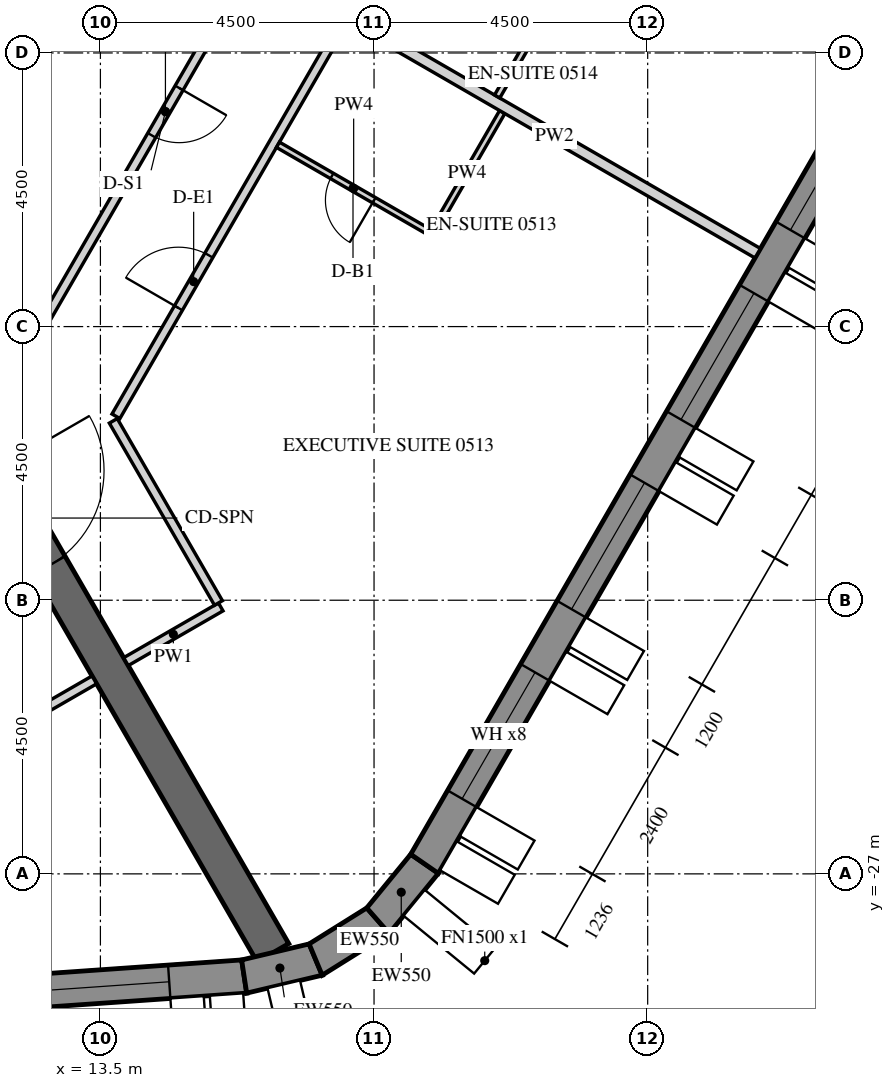
"""IFC4 building model, lengths in metres.
Left out: names, types, materials, properties, quantities, classifications, styles, units other than length and angle.
Written with IfcOpenShell. Run it as: python <this file> out.ifc"""

import sys

from ifc_helpers import new_model, si_unit, direction, frame, frame_2d, origin, place, context, subcontext, project, spatial, polyline, rectangle, outline, extrude, element, fill, save


model = new_model("IFC4")
c1 = context("Model", 3, precision=1e-05, world=origin(), true_north=direction((0.0, 1.0)))
c2 = subcontext(c1, "Body", "Model", "MODEL_VIEW")
j1 = project(units=[si_unit("LENGTHUNIT", "METRE"), si_unit("PLANEANGLEUNIT", "RADIAN")], contexts=[c1])
p1 = place(None, origin())
s1 = spatial("IfcSite", under=j1, at=p1, CompositionType="ELEMENT")
p2 = place(p1, origin())
s2 = spatial("IfcBuilding", under=s1, at=p2, CompositionType="ELEMENT")
p3 = place(p2, frame((0.0, 0.0, 80.4)))
s3 = spatial("IfcBuildingStorey", under=s2, at=p3, CompositionType="ELEMENT", Elevation=80.4)
p4 = place(p3, frame((-14.134, -30.786, -0.15), z_axis=(0.0, 0.0, 1.0), x_axis=(0.997564037441, 0.069756657061, 0.0)))
e1 = element("IfcWall", 1, at=p4, inside=s3, PredefinedType="SOLIDWALL", context=c2, shape_type="SweptSolid", body=[
    extrude(outline(polyline([(-0.026, -0.275), (30.094, -0.275), (30.049, 0.275), (0.026, 0.275), (-0.026, -0.275)])), origin(), (0.0, 0.0, 1.0), 3.9),
])
p5 = place(p4, frame((1.236, 0.0, 1.05)))
e2 = element("IfcOpeningElement", 2, at=p5, cuts=e1, PredefinedType="OPENING", context=c2, shape_type="SweptSolid", body=[
    extrude(rectangle(XDim=2.4, YDim=2.4, at=frame_2d((1.2, 1.2))), frame((0.0, 0.285, 0.0), z_axis=(0.0, -1.0, 0.0), x_axis=(1.0, 0.0, 0.0)), (0.0, 0.0, 1.0), 0.57),
])
p6 = place(p4, frame((4.835, 0.0, 1.05)))
e3 = element("IfcOpeningElement", 3, at=p6, cuts=e1, PredefinedType="OPENING", context=c2, shape_type="SweptSolid", body=[
    extrude(rectangle(XDim=2.4, YDim=2.4, at=frame_2d((1.2, 1.2))), frame((0.0, 0.285, 0.0), z_axis=(0.0, -1.0, 0.0), x_axis=(1.0, 0.0, 0.0)), (0.0, 0.0, 1.0), 0.57),
])
p7 = place(p4, frame((8.436, 0.0, 1.05)))
e4 = element("IfcOpeningElement", 4, at=p7, cuts=e1, PredefinedType="OPENING", context=c2, shape_type="SweptSolid", body=[
    extrude(rectangle(XDim=2.4, YDim=2.4, at=frame_2d((1.2, 1.2))), frame((0.0, 0.285, 0.0), z_axis=(0.0, -1.0, 0.0), x_axis=(1.0, 0.0, 0.0)), (0.0, 0.0, 1.0), 0.57),
])
p8 = place(p4, frame((12.035, 0.0, 1.05)))
e5 = element("IfcOpeningElement", 5, at=p8, cuts=e1, PredefinedType="OPENING", context=c2, shape_type="SweptSolid", body=[
    extrude(rectangle(XDim=2.4, YDim=2.4, at=frame_2d((1.2, 1.2))), frame((0.0, 0.285, 0.0), z_axis=(0.0, -1.0, 0.0), x_axis=(1.0, 0.0, 0.0)), (0.0, 0.0, 1.0), 0.57),
])
p9 = place(p4, frame((15.635, 0.0, 1.05)))
e6 = element("IfcOpeningElement", 6, at=p9, cuts=e1, PredefinedType="OPENING", context=c2, shape_type="SweptSolid", body=[
    extrude(rectangle(XDim=2.4, YDim=2.4, at=frame_2d((1.2, 1.2))), frame((0.0, 0.285, 0.0), z_axis=(0.0, -1.0, 0.0), x_axis=(1.0, 0.0, 0.0)), (0.0, 0.0, 1.0), 0.57),
])
p10 = place(p4, frame((19.236, 0.0, 1.05)))
e7 = element("IfcOpeningElement", 7, at=p10, cuts=e1, PredefinedType="OPENING", context=c2, shape_type="SweptSolid", body=[
    extrude(rectangle(XDim=2.4, YDim=2.4, at=frame_2d((1.2, 1.2))), frame((0.0, 0.285, 0.0), z_axis=(0.0, -1.0, 0.0), x_axis=(1.0, 0.0, 0.0)), (0.0, 0.0, 1.0), 0.57),
])
p11 = place(p4, frame((22.835, 0.0, 1.05)))
e8 = element("IfcOpeningElement", 8, at=p11, cuts=e1, PredefinedType="OPENING", context=c2, shape_type="SweptSolid", body=[
    extrude(rectangle(XDim=2.4, YDim=2.4, at=frame_2d((1.2, 1.2))), frame((0.0, 0.285, 0.0), z_axis=(0.0, -1.0, 0.0), x_axis=(1.0, 0.0, 0.0)), (0.0, 0.0, 1.0), 0.57),
])
p12 = place(p4, frame((26.436, 0.0, 1.05)))
e9 = element("IfcOpeningElement", 9, at=p12, cuts=e1, PredefinedType="OPENING", context=c2, shape_type="SweptSolid", body=[
    extrude(rectangle(XDim=2.4, YDim=2.4, at=frame_2d((1.2, 1.2))), frame((0.0, 0.285, 0.0), z_axis=(0.0, -1.0, 0.0), x_axis=(1.0, 0.0, 0.0)), (0.0, 0.0, 1.0), 0.57),
])
p13 = place(p3, frame((15.864, -28.688, -0.15), z_axis=(0.0, 0.0, 1.0), x_axis=(0.973063591128, 0.230536868247, 0.0)))
e10 = element("IfcWall", 10, at=p13, inside=s3, PredefinedType="SOLIDWALL", context=c2, shape_type="SweptSolid", body=[
    extrude(outline(polyline([(-0.022, -0.275), (1.253, -0.275), (1.163, 0.275), (0.022, 0.275), (-0.022, -0.275)])), origin(), (0.0, 0.0, 1.0), 3.9),
])
p14 = place(p3, frame((17.04, -28.41, -0.15), z_axis=(0.0, 0.0, 1.0), x_axis=(0.847952888306, 0.530071598195, 0.0)))
e11 = element("IfcWall", 11, at=p14, inside=s3, PredefinedType="SOLIDWALL", context=c2, shape_type="SweptSolid", body=[
    extrude(outline(polyline([(-0.045, -0.275), (1.253, -0.275), (1.163, 0.275), (0.045, 0.275), (-0.045, -0.275)])), origin(), (0.0, 0.0, 1.0), 3.9),
])
p15 = place(p3, frame((18.064, -27.769, -0.15), z_axis=(0.0, 0.0, 1.0), x_axis=(0.633842757806, 0.773461930787, 0.0)))
e12 = element("IfcWall", 12, at=p15, inside=s3, PredefinedType="SOLIDWALL", context=c2, shape_type="SweptSolid", body=[
    extrude(outline(polyline([(-0.045, -0.275), (1.231, -0.275), (1.186, 0.275), (0.045, 0.275), (-0.045, -0.275)])), origin(), (0.0, 0.0, 1.0), 3.9),
])
p16 = place(p3, frame((18.83, -26.835, -0.15), z_axis=(0.0, 0.0, 1.0), x_axis=(0.500003800416, 0.866023209602, 0.0)))
e13 = element("IfcWall", 13, at=p16, inside=s3, PredefinedType="SOLIDWALL", context=c2, shape_type="SweptSolid", body=[
    extrude(outline(polyline([(-0.022, -0.275), (30.097, -0.275), (30.045, 0.275), (0.022, 0.275), (-0.022, -0.275)])), origin(), (0.0, 0.0, 1.0), 3.9),
])
p17 = place(p16, frame((1.236, 0.0, 1.05)))
e14 = element("IfcOpeningElement", 14, at=p17, cuts=e13, PredefinedType="OPENING", context=c2, shape_type="SweptSolid", body=[
    extrude(rectangle(XDim=2.4, YDim=2.4, at=frame_2d((1.2, 1.2))), frame((0.0, 0.285, 0.0), z_axis=(0.0, -1.0, 0.0), x_axis=(1.0, 0.0, 0.0)), (0.0, 0.0, 1.0), 0.57),
])
p18 = place(p16, frame((4.835, 0.0, 1.05)))
e15 = element("IfcOpeningElement", 15, at=p18, cuts=e13, PredefinedType="OPENING", context=c2, shape_type="SweptSolid", body=[
    extrude(rectangle(XDim=2.4, YDim=2.4, at=frame_2d((1.2, 1.2))), frame((0.0, 0.285, 0.0), z_axis=(0.0, -1.0, 0.0), x_axis=(1.0, 0.0, 0.0)), (0.0, 0.0, 1.0), 0.57),
])
p19 = place(p16, frame((8.436, 0.0, 1.05)))
e16 = element("IfcOpeningElement", 16, at=p19, cuts=e13, PredefinedType="OPENING", context=c2, shape_type="SweptSolid", body=[
    extrude(rectangle(XDim=2.4, YDim=2.4, at=frame_2d((1.2, 1.2))), frame((0.0, 0.285, 0.0), z_axis=(0.0, -1.0, 0.0), x_axis=(1.0, 0.0, 0.0)), (0.0, 0.0, 1.0), 0.57),
])
p20 = place(p16, frame((12.035, 0.0, 1.05)))
e17 = element("IfcOpeningElement", 17, at=p20, cuts=e13, PredefinedType="OPENING", context=c2, shape_type="SweptSolid", body=[
    extrude(rectangle(XDim=2.4, YDim=2.4, at=frame_2d((1.2, 1.2))), frame((0.0, 0.285, 0.0), z_axis=(0.0, -1.0, 0.0), x_axis=(1.0, 0.0, 0.0)), (0.0, 0.0, 1.0), 0.57),
])
p21 = place(p16, frame((15.635, 0.0, 1.05)))
e18 = element("IfcOpeningElement", 18, at=p21, cuts=e13, PredefinedType="OPENING", context=c2, shape_type="SweptSolid", body=[
    extrude(rectangle(XDim=2.4, YDim=2.4, at=frame_2d((1.2, 1.2))), frame((0.0, 0.285, 0.0), z_axis=(0.0, -1.0, 0.0), x_axis=(1.0, 0.0, 0.0)), (0.0, 0.0, 1.0), 0.57),
])
p22 = place(p16, frame((19.236, 0.0, 1.05)))
e19 = element("IfcOpeningElement", 19, at=p22, cuts=e13, PredefinedType="OPENING", context=c2, shape_type="SweptSolid", body=[
    extrude(rectangle(XDim=2.4, YDim=2.4, at=frame_2d((1.2, 1.2))), frame((0.0, 0.285, 0.0), z_axis=(0.0, -1.0, 0.0), x_axis=(1.0, 0.0, 0.0)), (0.0, 0.0, 1.0), 0.57),
])
p23 = place(p16, frame((22.835, 0.0, 1.05)))
e20 = element("IfcOpeningElement", 20, at=p23, cuts=e13, PredefinedType="OPENING", context=c2, shape_type="SweptSolid", body=[
    extrude(rectangle(XDim=2.4, YDim=2.4, at=frame_2d((1.2, 1.2))), frame((0.0, 0.285, 0.0), z_axis=(0.0, -1.0, 0.0), x_axis=(1.0, 0.0, 0.0)), (0.0, 0.0, 1.0), 0.57),
])
p24 = place(p16, frame((26.436, 0.0, 1.05)))
e21 = element("IfcOpeningElement", 21, at=p24, cuts=e13, PredefinedType="OPENING", context=c2, shape_type="SweptSolid", body=[
    extrude(rectangle(XDim=2.4, YDim=2.4, at=frame_2d((1.2, 1.2))), frame((0.0, 0.285, 0.0), z_axis=(0.0, -1.0, 0.0), x_axis=(1.0, 0.0, 0.0)), (0.0, 0.0, 1.0), 0.57),
])
p25 = place(p3, frame((7.91, -13.7, -0.15), z_axis=(0.0, 0.0, 1.0), x_axis=(0.499999880136, 0.866025472988, 0.0)))
e22 = element("IfcWall", 22, at=p25, inside=s3, PredefinedType="SHEAR", context=c2, shape_type="SweptSolid", body=[
    extrude(outline(polyline([(-0.173, -0.3), (15.993, -0.3), (15.646, 0.3), (0.173, 0.3), (-0.173, -0.3)])), origin(), (0.0, 0.0, 1.0), 3.9),
])
p26 = place(p25, frame((7.039, 0.0, 0.15)))
e23 = element("IfcOpeningElement", 23, at=p26, cuts=e22, PredefinedType="OPENING", context=c2, shape_type="SweptSolid", body=[
    extrude(rectangle(XDim=1.8, YDim=2.4, at=frame_2d((0.9, 1.2))), frame((0.0, 0.31, 0.0), z_axis=(0.0, -1.0, 0.0), x_axis=(1.0, 0.0, 0.0)), (0.0, 0.0, 1.0), 0.62),
])
p27 = place(p3, frame((8.083, -14.0, -0.15), z_axis=(0.0, 0.0, 1.0), x_axis=(0.499997680643, -0.866026742862, 0.0)))
e24 = element("IfcWall", 24, at=p27, inside=s3, PredefinedType="SHEAR", context=c2, shape_type="SweptSolid", body=[
    extrude(rectangle(XDim=16.509, YDim=0.6, at=frame_2d((8.254, 0.0))), origin(), (0.0, 0.0, 1.0), 3.9),
])
p28 = place(p27, frame((7.354, 0.0, 0.15)))
e25 = element("IfcOpeningElement", 25, at=p28, cuts=e24, PredefinedType="OPENING", context=c2, shape_type="SweptSolid", body=[
    extrude(rectangle(XDim=1.8, YDim=2.4, at=frame_2d((0.9, 1.2))), frame((0.0, 0.31, 0.0), z_axis=(0.0, -1.0, 0.0), x_axis=(1.0, 0.0, 0.0)), (0.0, 0.0, 1.0), 0.62),
])
p29 = place(p3, frame((11.906, -24.673, 0.0), z_axis=(0.0, 0.0, 1.0), x_axis=(0.866013532718, 0.500020560727, 0.0)))
e26 = element("IfcWall", 26, at=p29, inside=s3, PredefinedType="PARTITIONING", context=c2, shape_type="SweptSolid", body=[
    extrude(rectangle(XDim=1.725, YDim=0.15, at=frame_2d((0.863, 0.0))), origin(), (0.0, 0.0, 1.0), 2.988),
])
p30 = place(p3, frame((13.92, -23.51, 0.0), z_axis=(0.0, 0.0, 1.0), x_axis=(0.866047807691, 0.499961193289, 0.0)))
e27 = element("IfcWall", 27, at=p30, inside=s3, PredefinedType="PARTITIONING", context=c2, shape_type="SweptSolid", body=[
    extrude(rectangle(XDim=1.8, YDim=0.15, at=frame_2d((0.9, 0.0))), origin(), (0.0, 0.0, 1.0), 2.988),
])
p31 = place(p3, frame((15.441, -22.545, 0.0), z_axis=(0.0, 0.0, 1.0), x_axis=(-0.500003541824, 0.866023358902, 0.0)))
e28 = element("IfcWall", 28, at=p31, inside=s3, PredefinedType="PARTITIONING", context=c2, shape_type="SweptSolid", body=[
    extrude(rectangle(XDim=3.458, YDim=0.15, at=frame_2d((1.729, 0.0))), origin(), (0.0, 0.0, 1.0), 2.988),
])
p32 = place(p3, frame((13.755, -19.475, 0.0), z_axis=(0.0, 0.0, 1.0), x_axis=(0.50000013933, 0.866025323342, 0.0)))
e29 = element("IfcWall", 29, at=p32, inside=s3, PredefinedType="PARTITIONING", context=c2, shape_type="SweptSolid", body=[
    extrude(rectangle(XDim=23.517, YDim=0.15, at=frame_2d((11.758, 0.0))), origin(), (0.0, 0.0, 1.0), 2.988),
])
p33 = place(p32, frame((2.056, 0.0, 0.0)))
e30 = element("IfcOpeningElement", 30, at=p33, cuts=e29, PredefinedType="OPENING", context=c2, shape_type="SweptSolid", body=[
    extrude(rectangle(XDim=1.0, YDim=2.1, at=frame_2d((0.5, 1.05))), frame((0.0, 0.085, 0.0), z_axis=(0.0, -1.0, 0.0), x_axis=(1.0, 0.0, 0.0)), (0.0, 0.0, 1.0), 0.17),
])
p34 = place(p32, frame((15.499, 0.0, 0.0)))
e31 = element("IfcOpeningElement", 31, at=p34, cuts=e29, PredefinedType="OPENING", context=c2, shape_type="SweptSolid", body=[
    extrude(rectangle(XDim=1.0, YDim=2.1, at=frame_2d((0.5, 1.05))), frame((0.0, 0.085, 0.0), z_axis=(0.0, -1.0, 0.0), x_axis=(1.0, 0.0, 0.0)), (0.0, 0.0, 1.0), 0.17),
])
p35 = place(p3, frame((16.643, -10.874, 0.0), z_axis=(0.0, 0.0, 1.0), x_axis=(-0.50000192383, -0.866024293058, 0.0)))
e32 = element("IfcWall", 32, at=p35, inside=s3, PredefinedType="PARTITIONING", context=c2, shape_type="SweptSolid", body=[
    extrude(rectangle(XDim=8.293, YDim=0.15, at=frame_2d((4.146, 0.0))), origin(), (0.0, 0.0, 1.0), 2.988),
])
p36 = place(p35, frame((3.697, 0.0, 0.0)))
e33 = element("IfcOpeningElement", 33, at=p36, cuts=e32, PredefinedType="OPENING", context=c2, shape_type="SweptSolid", body=[
    extrude(rectangle(XDim=0.9, YDim=2.1, at=frame_2d((0.45, 1.05))), frame((0.0, 0.085, 0.0), z_axis=(0.0, -1.0, 0.0), x_axis=(1.0, 0.0, 0.0)), (0.0, 0.0, 1.0), 0.17),
])
p37 = place(p3, frame((20.108, -14.472, 0.0), z_axis=(0.0, 0.0, 1.0), x_axis=(-0.500015210774, -0.866016621662, 0.0)))
e34 = element("IfcWall", 34, at=p37, inside=s3, PredefinedType="PARTITIONING", context=c2, shape_type="SweptSolid", body=[
    extrude(rectangle(XDim=2.31, YDim=0.1, at=frame_2d((1.155, 0.0))), origin(), (0.0, 0.0, 1.0), 2.988),
])
p38 = place(p3, frame((18.91, -16.447, 0.0), z_axis=(0.0, 0.0, 1.0), x_axis=(-0.866018712932, 0.500011588718, 0.0)))
e35 = element("IfcWall", 35, at=p38, inside=s3, PredefinedType="PARTITIONING", context=c2, shape_type="SweptSolid", body=[
    extrude(rectangle(XDim=2.875, YDim=0.1, at=frame_2d((1.438, 0.0))), origin(), (0.0, 0.0, 1.0), 2.988),
])
p39 = place(p38, frame((1.05, 0.0, 0.0)))
e36 = element("IfcOpeningElement", 36, at=p39, cuts=e35, PredefinedType="OPENING", context=c2, shape_type="SweptSolid", body=[
    extrude(rectangle(XDim=0.8, YDim=2.1, at=frame_2d((0.4, 1.05))), frame((0.0, 0.06, 0.0), z_axis=(0.0, -1.0, 0.0), x_axis=(1.0, 0.0, 0.0)), (0.0, 0.0, 1.0), 0.12),
])
p40 = place(p3, frame((24.31, -16.794, 0.0), z_axis=(0.0, 0.0, 1.0), x_axis=(-0.866027174938, 0.499996932259, 0.0)))
e37 = element("IfcWall", 37, at=p40, inside=s3, PredefinedType="PARTITIONING", context=c2, shape_type="SweptSolid", body=[
    extrude(rectangle(XDim=7.725, YDim=0.18, at=frame_2d((3.863, 0.0))), origin(), (0.0, 0.0, 1.0), 2.988),
])
p41 = place(p3, frame((21.155, -12.259, 0.0), z_axis=(0.0, 0.0, 1.0), x_axis=(-0.49995000081, -0.866054268906, 0.0)))
e38 = element("IfcWall", 38, at=p41, inside=s3, PredefinedType="PARTITIONING", context=c2, shape_type="SweptSolid", body=[
    extrude(rectangle(XDim=2.26, YDim=0.1, at=frame_2d((1.13, 0.0))), origin(), (0.0, 0.0, 1.0), 2.988),
])
p42 = place(p12, frame((0.0, 0.205, 0.0)))
e39 = element("IfcWindow", 39, at=p42, inside=s3, PartitioningType="DOUBLE_PANEL_VERTICAL", PredefinedType="WINDOW", context=c2, shape_type="SweptSolid", body=[
    extrude(rectangle(XDim=2.4, YDim=2.4, at=frame_2d((1.2, 1.2))), frame((0.0, 0.03, 0.0), z_axis=(0.0, -1.0, 0.0), x_axis=(1.0, 0.0, 0.0)), (0.0, 0.0, 1.0), 0.06),
])
fill(e9, e39)
p43 = place(p17, frame((0.0, 0.205, 0.0)))
e40 = element("IfcWindow", 40, at=p43, inside=s3, PartitioningType="DOUBLE_PANEL_VERTICAL", PredefinedType="WINDOW", context=c2, shape_type="SweptSolid", body=[
    extrude(rectangle(XDim=2.4, YDim=2.4, at=frame_2d((1.2, 1.2))), frame((0.0, 0.03, 0.0), z_axis=(0.0, -1.0, 0.0), x_axis=(1.0, 0.0, 0.0)), (0.0, 0.0, 1.0), 0.06),
])
fill(e14, e40)
p44 = place(p18, frame((0.0, 0.205, 0.0)))
e41 = element("IfcWindow", 41, at=p44, inside=s3, PartitioningType="DOUBLE_PANEL_VERTICAL", PredefinedType="WINDOW", context=c2, shape_type="SweptSolid", body=[
    extrude(rectangle(XDim=2.4, YDim=2.4, at=frame_2d((1.2, 1.2))), frame((0.0, 0.03, 0.0), z_axis=(0.0, -1.0, 0.0), x_axis=(1.0, 0.0, 0.0)), (0.0, 0.0, 1.0), 0.06),
])
fill(e15, e41)
p45 = place(p19, frame((0.0, 0.205, 0.0)))
e42 = element("IfcWindow", 42, at=p45, inside=s3, PartitioningType="DOUBLE_PANEL_VERTICAL", PredefinedType="WINDOW", context=c2, shape_type="SweptSolid", body=[
    extrude(rectangle(XDim=2.4, YDim=2.4, at=frame_2d((1.2, 1.2))), frame((0.0, 0.03, 0.0), z_axis=(0.0, -1.0, 0.0), x_axis=(1.0, 0.0, 0.0)), (0.0, 0.0, 1.0), 0.06),
])
fill(e16, e42)
p46 = place(p20, frame((0.0, 0.205, 0.0)))
e43 = element("IfcWindow", 43, at=p46, inside=s3, PartitioningType="DOUBLE_PANEL_VERTICAL", PredefinedType="WINDOW", context=c2, shape_type="SweptSolid", body=[
    extrude(rectangle(XDim=2.4, YDim=2.4, at=frame_2d((1.2, 1.2))), frame((0.0, 0.03, 0.0), z_axis=(0.0, -1.0, 0.0), x_axis=(1.0, 0.0, 0.0)), (0.0, 0.0, 1.0), 0.06),
])
fill(e17, e43)
p47 = place(p33, origin())
e44 = element("IfcDoor", 44, at=p47, inside=s3, OperationType="SINGLE_SWING_RIGHT", PredefinedType="DOOR", context=c2, shape_type="SweptSolid", body=[
    extrude(rectangle(XDim=1.0, YDim=2.1, at=frame_2d((0.5, 1.05))), frame((0.0, 0.025, 0.0), z_axis=(0.0, -1.0, 0.0), x_axis=(1.0, 0.0, 0.0)), (0.0, 0.0, 1.0), 0.05),
])
fill(e30, e44)
p48 = place(p39, origin())
e45 = element("IfcDoor", 45, at=p48, inside=s3, OperationType="SINGLE_SWING_LEFT", PredefinedType="DOOR", context=c2, shape_type="SweptSolid", body=[
    extrude(rectangle(XDim=0.8, YDim=2.1, at=frame_2d((0.4, 1.05))), frame((0.0, 0.025, 0.0), z_axis=(0.0, -1.0, 0.0), x_axis=(1.0, 0.0, 0.0)), (0.0, 0.0, 1.0), 0.05),
])
fill(e36, e45)
p49 = place(p36, origin())
e46 = element("IfcDoor", 46, at=p49, inside=s3, OperationType="SINGLE_SWING_RIGHT", PredefinedType="DOOR", context=c2, shape_type="SweptSolid", body=[
    extrude(rectangle(XDim=0.9, YDim=2.1, at=frame_2d((0.45, 1.05))), frame((0.0, 0.025, 0.0), z_axis=(0.0, -1.0, 0.0), x_axis=(1.0, 0.0, 0.0)), (0.0, 0.0, 1.0), 0.05),
])
fill(e33, e46)
save(model, sys.argv[1])
